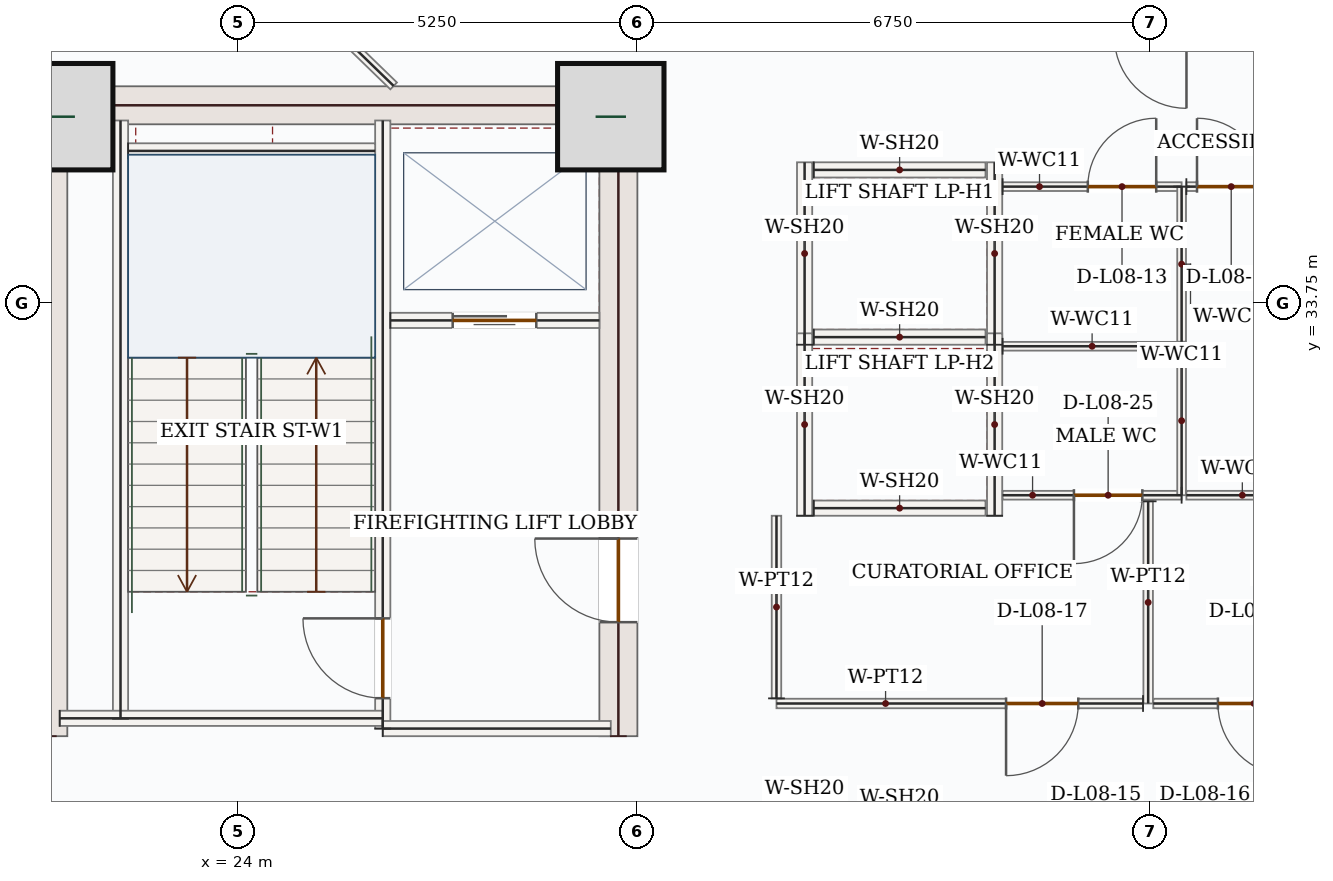
"""IFC4 building model, lengths in metres.
Left out: names, types, materials, properties, quantities, classifications, styles, units other than length and angle.
Written with IfcOpenShell. Run it as: python <this file> out.ifc"""

import sys

from ifc_helpers import new_model, si_unit, direction, frame, frame_2d, origin, origin_2d, place, context, subcontext, project, spatial, rectangle, extrude, source, transform, mapped, element, fill, save


model = new_model("IFC4")
c1 = context("Model", 3, precision=1e-05, world=origin(), true_north=direction((0.0, 1.0)))
c2 = subcontext(c1, "Body", "Model", "MODEL_VIEW")
j1 = project(units=[si_unit("LENGTHUNIT", "METRE"), si_unit("PLANEANGLEUNIT", "RADIAN")], contexts=[c1])
p1 = place(None, origin())
s1 = spatial("IfcSite", under=j1, at=p1, CompositionType="ELEMENT")
p2 = place(p1, origin())
s2 = spatial("IfcBuilding", under=s1, at=p2, CompositionType="ELEMENT")
p3 = place(p2, frame((0.0, 0.0, 41.7)))
s3 = spatial("IfcBuildingStorey", under=s2, at=p3, CompositionType="ELEMENT", Elevation=41.7)
m1 = source(origin(), c2, "Body", "SweptSolid", [
    extrude(rectangle(XDim=8.55, YDim=0.5, at=frame_2d((4.275, 0.0))), origin(), (0.0, 0.0, 1.0), 3.95),
])
p4 = place(p3, frame((21.5, 28.05, 0.0), z_axis=(0.0, 0.0, 1.0), x_axis=(0.0, 1.0, 0.0)))
e1 = element("IfcWall", 1, at=p4, inside=s3, PredefinedType="SHEAR", context=c2, shape_type="MappedRepresentation", body=[
    mapped(m1, transform((0.0, 0.0, 0.0), x_axis=(1.0, 0.0, 0.0), y_axis=(0.0, 1.0, 0.0), z_axis=(0.0, 0.0, 1.0), scale=1.0)),
])
p5 = place(p3, frame((29.0, 28.05, 0.0), z_axis=(0.0, 0.0, 1.0), x_axis=(0.0, 1.0, 0.0)))
e2 = element("IfcWall", 2, at=p5, inside=s3, PredefinedType="SHEAR", context=c2, shape_type="SweptSolid", body=[
    extrude(rectangle(XDim=8.55, YDim=0.5, at=frame_2d((4.275, 0.0))), origin(), (0.0, 0.0, 1.0), 3.95),
])
p6 = place(p5, frame((1.5, 0.0, 0.0)))
e3 = element("IfcOpeningElement", 3, at=p6, cuts=e2, PredefinedType="OPENING", context=c2, shape_type="SweptSolid", body=[
    extrude(rectangle(XDim=1.1, YDim=2.2, at=frame_2d((0.55, 1.1))), frame((0.0, 0.26, 0.0), z_axis=(0.0, -1.0, 0.0), x_axis=(1.0, 0.0, 0.0)), (0.0, 0.0, 1.0), 0.52),
])
m2 = source(origin(), c2, "Body", "SweptSolid", [
    extrude(rectangle(XDim=7.0, YDim=0.5, at=frame_2d((3.5, 0.0))), origin(), (0.0, 0.0, 1.0), 3.95),
])
p7 = place(p3, frame((21.75, 36.35, 0.0), z_axis=(0.0, 0.0, 1.0), x_axis=(1.0, 0.0, 0.0)))
e4 = element("IfcWall", 4, at=p7, inside=s3, PredefinedType="SHEAR", context=c2, shape_type="MappedRepresentation", body=[
    mapped(m2, transform((0.0, 0.0, 0.0), x_axis=(1.0, 0.0, 0.0), y_axis=(0.0, 1.0, 0.0), z_axis=(0.0, 0.0, 1.0), scale=1.0)),
])
m3 = source(origin(), c2, "Body", "SweptSolid", [
    extrude(rectangle(XDim=1.4, YDim=1.4, at=origin_2d()), origin(), (0.0, 0.0, 1.0), 4.2),
])
for number, where, z_axis, x_axis in (
    (5, (21.65, 36.2, 0.0), (0.0, 0.0, 1.0), (1.0, 0.0, 0.0)),
    (6, (28.9, 36.2, 0.0), (0.0, 0.0, 1.0), (1.0, 0.0, 0.0)),
):
    element("IfcColumn", number, at=place(p3, frame(where, z_axis=z_axis, x_axis=x_axis)), inside=s3, PredefinedType="COLUMN", context=c2, shape_type="MappedRepresentation", body=[
        mapped(m3, transform((0.0, 0.0, 0.0), x_axis=(1.0, 0.0, 0.0), y_axis=(0.0, 1.0, 0.0), z_axis=(0.0, 0.0, 1.0), scale=1.0)),
    ])
m4 = source(origin(), c2, "Body", "SweptSolid", [
    extrude(rectangle(XDim=5.258, YDim=0.32, at=frame_2d((2.629, 0.0))), origin(), (0.0, 0.0, 1.0), 3.95),
])
p8 = place(p3, frame((18.94, 35.542, 0.0), z_axis=(0.0, 0.0, 1.0), x_axis=(0.707106781187, 0.707106781187, 0.0)))
e7 = element("IfcWall", 7, at=p8, inside=s3, PredefinedType="SOLIDWALL", context=c2, shape_type="MappedRepresentation", body=[
    mapped(m4, transform((0.0, 0.0, 0.0), x_axis=(1.0, 0.0, 0.0), y_axis=(0.0, 1.0, 0.0), z_axis=(0.0, 0.0, 1.0), scale=1.0)),
])
m5 = source(origin(), c2, "Body", "SweptSolid", [
    extrude(rectangle(XDim=7.87, YDim=0.2, at=frame_2d((3.935, 0.0))), origin(), (0.0, 0.0, 1.0), 3.95),
])
p9 = place(p3, frame((22.45, 28.28, 0.0), z_axis=(0.0, 0.0, 1.0), x_axis=(0.0, 1.0, 0.0)))
e8 = element("IfcWall", 8, at=p9, inside=s3, PredefinedType="SOLIDWALL", context=c2, shape_type="MappedRepresentation", body=[
    mapped(m5, transform((0.0, 0.0, 0.0), x_axis=(1.0, 0.0, 0.0), y_axis=(0.0, 1.0, 0.0), z_axis=(0.0, 0.0, 1.0), scale=1.0)),
])
p10 = place(p3, frame((25.9, 28.15, 0.0), z_axis=(0.0, 0.0, 1.0), x_axis=(0.0, 1.0, 0.0)))
e9 = element("IfcWall", 9, at=p10, inside=s3, PredefinedType="SOLIDWALL", context=c2, shape_type="SweptSolid", body=[
    extrude(rectangle(XDim=8.0, YDim=0.2, at=frame_2d((4.0, 0.0))), origin(), (0.0, 0.0, 1.0), 3.95),
])
p11 = place(p10, frame((0.4, 0.0, 0.0)))
e10 = element("IfcOpeningElement", 10, at=p11, cuts=e9, PredefinedType="OPENING", context=c2, shape_type="SweptSolid", body=[
    extrude(rectangle(XDim=1.05, YDim=2.15, at=frame_2d((0.525, 1.075))), frame((0.0, 0.11, 0.0), z_axis=(0.0, -1.0, 0.0), x_axis=(1.0, 0.0, 0.0)), (0.0, 0.0, 1.0), 0.22),
])
m6 = source(origin(), c2, "Body", "SweptSolid", [
    extrude(rectangle(XDim=4.25, YDim=0.2, at=frame_2d((2.125, 0.0))), origin(), (0.0, 0.0, 1.0), 3.95),
])
p12 = place(p3, frame((21.65, 28.285, 0.0), z_axis=(0.0, 0.0, 1.0), x_axis=(1.0, 0.0, 0.0)))
e11 = element("IfcWall", 11, at=p12, inside=s3, PredefinedType="SOLIDWALL", context=c2, shape_type="MappedRepresentation", body=[
    mapped(m6, transform((0.0, 0.0, 0.0), x_axis=(1.0, 0.0, 0.0), y_axis=(0.0, 1.0, 0.0), z_axis=(0.0, 0.0, 1.0), scale=1.0)),
])
m7 = source(origin(), c2, "Body", "SweptSolid", [
    extrude(rectangle(XDim=3.0, YDim=0.2, at=frame_2d((1.5, 0.0))), origin(), (0.0, 0.0, 1.0), 3.95),
])
p13 = place(p3, frame((25.9, 28.15, 0.0), z_axis=(0.0, 0.0, 1.0), x_axis=(1.0, 0.0, 0.0)))
e12 = element("IfcWall", 12, at=p13, inside=s3, PredefinedType="SOLIDWALL", context=c2, shape_type="MappedRepresentation", body=[
    mapped(m7, transform((0.0, 0.0, 0.0), x_axis=(1.0, 0.0, 0.0), y_axis=(0.0, 1.0, 0.0), z_axis=(0.0, 0.0, 1.0), scale=1.0)),
])
m8 = source(origin(), c2, "Body", "SweptSolid", [
    extrude(rectangle(XDim=3.25, YDim=0.2, at=frame_2d((1.625, 0.0))), origin(), (0.0, 0.0, 1.0), 3.95),
])
p14 = place(p3, frame((22.55, 35.75, 0.0), z_axis=(0.0, 0.0, 1.0), x_axis=(1.0, 0.0, 0.0)))
e13 = element("IfcWall", 13, at=p14, inside=s3, PredefinedType="SOLIDWALL", context=c2, shape_type="MappedRepresentation", body=[
    mapped(m8, transform((0.0, 0.0, 0.0), x_axis=(1.0, 0.0, 0.0), y_axis=(0.0, 1.0, 0.0), z_axis=(0.0, 0.0, 1.0), scale=1.0)),
])
p15 = place(p3, frame((26.0, 33.52, 0.0), z_axis=(0.0, 0.0, 1.0), x_axis=(1.0, 0.0, 0.0)))
e14 = element("IfcWall", 14, at=p15, inside=s3, PredefinedType="SOLIDWALL", context=c2, shape_type="SweptSolid", body=[
    extrude(rectangle(XDim=2.75, YDim=0.2, at=frame_2d((1.375, 0.0))), origin(), (0.0, 0.0, 1.0), 3.95),
])
p16 = place(p15, frame((0.82, 0.0, 0.0)))
e15 = element("IfcOpeningElement", 15, at=p16, cuts=e14, PredefinedType="OPENING", context=c2, shape_type="SweptSolid", body=[
    extrude(rectangle(XDim=1.1, YDim=2.15, at=frame_2d((0.55, 1.075))), frame((0.0, 0.11, 0.0), z_axis=(0.0, -1.0, 0.0), x_axis=(1.0, 0.0, 0.0)), (0.0, 0.0, 1.0), 0.22),
])
m9 = source(origin(), c2, "Body", "SweptSolid", [
    extrude(rectangle(XDim=2.4, YDim=0.2, at=frame_2d((1.2, 0.0))), origin(), (0.0, 0.0, 1.0), 3.95),
])
for number, where, z_axis, x_axis in (
    (16, (31.45, 33.2, 0.0), (0.0, 0.0, 1.0), (0.0, 1.0, 0.0)),
    (17, (33.95, 33.2, 0.0), (0.0, 0.0, 1.0), (0.0, 1.0, 0.0)),
):
    element("IfcWall", number, at=place(p3, frame(where, z_axis=z_axis, x_axis=x_axis)), inside=s3, PredefinedType="SOLIDWALL", context=c2, shape_type="MappedRepresentation", body=[
        mapped(m9, transform((0.0, 0.0, 0.0), x_axis=(1.0, 0.0, 0.0), y_axis=(0.0, 1.0, 0.0), z_axis=(0.0, 0.0, 1.0), scale=1.0)),
    ])
m10 = source(origin(), c2, "Body", "SweptSolid", [
    extrude(rectangle(XDim=2.26, YDim=0.2, at=frame_2d((1.13, 0.0))), origin(), (0.0, 0.0, 1.0), 3.95),
])
for number, where, z_axis, x_axis in (
    (18, (31.57, 33.3, 0.0), (0.0, 0.0, 1.0), (1.0, 0.0, 0.0)),
    (19, (31.57, 35.5, 0.0), (0.0, 0.0, 1.0), (1.0, 0.0, 0.0)),
):
    element("IfcWall", number, at=place(p3, frame(where, z_axis=z_axis, x_axis=x_axis)), inside=s3, PredefinedType="SOLIDWALL", context=c2, shape_type="MappedRepresentation", body=[
        mapped(m10, transform((0.0, 0.0, 0.0), x_axis=(1.0, 0.0, 0.0), y_axis=(0.0, 1.0, 0.0), z_axis=(0.0, 0.0, 1.0), scale=1.0)),
    ])
for number, where, z_axis, x_axis in (
    (20, (31.45, 30.95, 0.0), (0.0, 0.0, 1.0), (0.0, 1.0, 0.0)),
    (21, (33.95, 30.95, 0.0), (0.0, 0.0, 1.0), (0.0, 1.0, 0.0)),
):
    element("IfcWall", number, at=place(p3, frame(where, z_axis=z_axis, x_axis=x_axis)), inside=s3, PredefinedType="SOLIDWALL", context=c2, shape_type="MappedRepresentation", body=[
        mapped(m9, transform((0.0, 0.0, 0.0), x_axis=(1.0, 0.0, 0.0), y_axis=(0.0, 1.0, 0.0), z_axis=(0.0, 0.0, 1.0), scale=1.0)),
    ])
p17 = place(p3, frame((31.57, 31.05, 0.0), z_axis=(0.0, 0.0, 1.0), x_axis=(1.0, 0.0, 0.0)))
e22 = element("IfcWall", 22, at=p17, inside=s3, PredefinedType="SOLIDWALL", context=c2, shape_type="MappedRepresentation", body=[
    mapped(m10, transform((0.0, 0.0, 0.0), x_axis=(1.0, 0.0, 0.0), y_axis=(0.0, 1.0, 0.0), z_axis=(0.0, 0.0, 1.0), scale=1.0)),
])
p18 = place(p3, frame((36.41, 31.22, 0.0), z_axis=(0.0, 0.0, 1.0), x_axis=(-1.0, 0.0, 0.0)))
e23 = element("IfcWall", 23, at=p18, inside=s3, PredefinedType="PARTITIONING", context=c2, shape_type="SweptSolid", body=[
    extrude(rectangle(XDim=2.355, YDim=0.115, at=frame_2d((1.177, 0.0))), origin(), (0.0, 0.0, 1.0), 3.95),
])
p19 = place(p18, frame((0.517, 0.0, 0.0)))
e24 = element("IfcOpeningElement", 24, at=p19, cuts=e23, PredefinedType="OPENING", context=c2, shape_type="SweptSolid", body=[
    extrude(rectangle(XDim=0.9, YDim=2.1, at=frame_2d((0.45, 1.05))), frame((0.0, 0.067, 0.0), z_axis=(0.0, -1.0, 0.0), x_axis=(1.0, 0.0, 0.0)), (0.0, 0.0, 1.0), 0.135),
])
m11 = source(origin(), c2, "Body", "SweptSolid", [
    extrude(rectangle(XDim=2.355, YDim=0.115, at=frame_2d((1.177, 0.0))), origin(), (0.0, 0.0, 1.0), 3.95),
])
p20 = place(p3, frame((34.055, 33.18, 0.0), z_axis=(0.0, 0.0, 1.0), x_axis=(1.0, 0.0, 0.0)))
e25 = element("IfcWall", 25, at=p20, inside=s3, PredefinedType="PARTITIONING", context=c2, shape_type="MappedRepresentation", body=[
    mapped(m11, transform((0.0, 0.0, 0.0), x_axis=(1.0, 0.0, 0.0), y_axis=(0.0, 1.0, 0.0), z_axis=(0.0, 0.0, 1.0), scale=1.0)),
])
m12 = source(origin(), c2, "Body", "SweptSolid", [
    extrude(rectangle(XDim=1.96, YDim=0.115, at=frame_2d((0.98, 0.0))), origin(), (0.0, 0.0, 1.0), 3.95),
])
p21 = place(p3, frame((36.41, 33.18, 0.0), z_axis=(0.0, 0.0, 1.0), x_axis=(0.0, -1.0, 0.0)))
e26 = element("IfcWall", 26, at=p21, inside=s3, PredefinedType="PARTITIONING", context=c2, shape_type="MappedRepresentation", body=[
    mapped(m12, transform((0.0, 0.0, 0.0), x_axis=(1.0, 0.0, 0.0), y_axis=(0.0, 1.0, 0.0), z_axis=(0.0, 0.0, 1.0), scale=1.0)),
])
p22 = place(p3, frame((34.055, 35.28, 0.0), z_axis=(0.0, 0.0, 1.0), x_axis=(1.0, 0.0, 0.0)))
e27 = element("IfcWall", 27, at=p22, inside=s3, PredefinedType="PARTITIONING", context=c2, shape_type="SweptSolid", body=[
    extrude(rectangle(XDim=2.355, YDim=0.115, at=frame_2d((1.177, 0.0))), origin(), (0.0, 0.0, 1.0), 3.95),
])
p23 = place(p22, frame((1.121, 0.0, 0.0)))
e28 = element("IfcOpeningElement", 28, at=p23, cuts=e27, PredefinedType="OPENING", context=c2, shape_type="SweptSolid", body=[
    extrude(rectangle(XDim=0.9, YDim=2.1, at=frame_2d((0.45, 1.05))), frame((0.0, 0.067, 0.0), z_axis=(0.0, -1.0, 0.0), x_axis=(1.0, 0.0, 0.0)), (0.0, 0.0, 1.0), 0.135),
])
m13 = source(origin(), c2, "Body", "SweptSolid", [
    extrude(rectangle(XDim=2.04, YDim=0.115, at=frame_2d((1.02, 0.0))), origin(), (0.0, 0.0, 1.0), 3.95),
])
p24 = place(p3, frame((36.41, 35.28, 0.0), z_axis=(0.0, 0.0, 1.0), x_axis=(0.0, -1.0, 0.0)))
e29 = element("IfcWall", 29, at=p24, inside=s3, PredefinedType="PARTITIONING", context=c2, shape_type="MappedRepresentation", body=[
    mapped(m13, transform((0.0, 0.0, 0.0), x_axis=(1.0, 0.0, 0.0), y_axis=(0.0, 1.0, 0.0), z_axis=(0.0, 0.0, 1.0), scale=1.0)),
])
m14 = source(origin(), c2, "Body", "SweptSolid", [
    extrude(rectangle(XDim=1.473, YDim=0.115, at=frame_2d((0.736, 0.0))), origin(), (0.0, 0.0, 1.0), 3.95),
])
p25 = place(p3, frame((37.945, 31.22, 0.0), z_axis=(0.0, 0.0, 1.0), x_axis=(-1.0, 0.0, 0.0)))
e30 = element("IfcWall", 30, at=p25, inside=s3, PredefinedType="PARTITIONING", context=c2, shape_type="MappedRepresentation", body=[
    mapped(m14, transform((0.0, 0.0, 0.0), x_axis=(1.0, 0.0, 0.0), y_axis=(0.0, 1.0, 0.0), z_axis=(0.0, 0.0, 1.0), scale=1.0)),
])
p26 = place(p3, frame((36.472, 35.28, 0.0), z_axis=(0.0, 0.0, 1.0), x_axis=(1.0, 0.0, 0.0)))
e31 = element("IfcWall", 31, at=p26, inside=s3, PredefinedType="PARTITIONING", context=c2, shape_type="SweptSolid", body=[
    extrude(rectangle(XDim=1.473, YDim=0.115, at=frame_2d((0.736, 0.0))), origin(), (0.0, 0.0, 1.0), 3.95),
])
p27 = place(p26, frame((0.14, 0.0, 0.0)))
e32 = element("IfcOpeningElement", 32, at=p27, cuts=e31, PredefinedType="OPENING", context=c2, shape_type="SweptSolid", body=[
    extrude(rectangle(XDim=0.9, YDim=2.1, at=frame_2d((0.45, 1.05))), frame((0.0, 0.067, 0.0), z_axis=(0.0, -1.0, 0.0), x_axis=(1.0, 0.0, 0.0)), (0.0, 0.0, 1.0), 0.135),
])
m15 = source(origin(), c2, "Body", "SweptSolid", [
    extrude(rectangle(XDim=2.66, YDim=0.125, at=frame_2d((1.33, 0.0))), origin(), (0.0, 0.0, 1.0), 3.95),
])
p28 = place(p3, frame((35.97, 31.14, 0.0), z_axis=(0.0, 0.0, 1.0), x_axis=(0.0, -1.0, 0.0)))
e33 = element("IfcWall", 33, at=p28, inside=s3, PredefinedType="PARTITIONING", context=c2, shape_type="MappedRepresentation", body=[
    mapped(m15, transform((0.0, 0.0, 0.0), x_axis=(1.0, 0.0, 0.0), y_axis=(0.0, 1.0, 0.0), z_axis=(0.0, 0.0, 1.0), scale=1.0)),
])
p29 = place(p3, frame((35.903, 28.48, 0.0), z_axis=(0.0, 0.0, 1.0), x_axis=(-1.0, 0.0, 0.0)))
e34 = element("IfcWall", 34, at=p29, inside=s3, PredefinedType="PARTITIONING", context=c2, shape_type="SweptSolid", body=[
    extrude(rectangle(XDim=4.823, YDim=0.125, at=frame_2d((2.411, 0.0))), origin(), (0.0, 0.0, 1.0), 3.95),
])
p30 = place(p29, frame((0.852, 0.0, 0.0)))
e35 = element("IfcOpeningElement", 35, at=p30, cuts=e34, PredefinedType="OPENING", context=c2, shape_type="SweptSolid", body=[
    extrude(rectangle(XDim=0.95, YDim=2.15, at=frame_2d((0.475, 1.075))), frame((0.0, 0.073, 0.0), z_axis=(0.0, -1.0, 0.0), x_axis=(1.0, 0.0, 0.0)), (0.0, 0.0, 1.0), 0.145),
])
m16 = source(origin(), c2, "Body", "SweptSolid", [
    extrude(rectangle(XDim=2.402, YDim=0.125, at=frame_2d((1.201, 0.0))), origin(), (0.0, 0.0, 1.0), 3.95),
])
p31 = place(p3, frame((31.08, 28.548, 0.0), z_axis=(0.0, 0.0, 1.0), x_axis=(0.0, 1.0, 0.0)))
e36 = element("IfcWall", 36, at=p31, inside=s3, PredefinedType="PARTITIONING", context=c2, shape_type="MappedRepresentation", body=[
    mapped(m16, transform((0.0, 0.0, 0.0), x_axis=(1.0, 0.0, 0.0), y_axis=(0.0, 1.0, 0.0), z_axis=(0.0, 0.0, 1.0), scale=1.0)),
])
p32 = place(p3, frame((40.853, 28.48, 0.0), z_axis=(0.0, 0.0, 1.0), x_axis=(-1.0, 0.0, 0.0)))
e37 = element("IfcWall", 37, at=p32, inside=s3, PredefinedType="PARTITIONING", context=c2, shape_type="SweptSolid", body=[
    extrude(rectangle(XDim=4.815, YDim=0.125, at=frame_2d((2.407, 0.0))), origin(), (0.0, 0.0, 1.0), 3.95),
])
p33 = place(p32, frame((3.015, 0.0, 0.0)))
e38 = element("IfcOpeningElement", 38, at=p33, cuts=e37, PredefinedType="OPENING", context=c2, shape_type="SweptSolid", body=[
    extrude(rectangle(XDim=0.95, YDim=2.15, at=frame_2d((0.475, 1.075))), frame((0.0, 0.073, 0.0), z_axis=(0.0, -1.0, 0.0), x_axis=(1.0, 0.0, 0.0)), (0.0, 0.0, 1.0), 0.145),
])
m17 = source(origin(), c2, "Body", "SweptSolid", [
    extrude(rectangle(XDim=1.771, YDim=0.125, at=frame_2d((0.885, 0.0))), origin(), (0.0, 0.0, 1.0), 3.95),
])
p34 = place(p3, frame((24.772, 37.838, 0.0), z_axis=(0.0, 0.0, 1.0), x_axis=(0.717777212316, -0.696272844135, 0.0)))
e39 = element("IfcWall", 39, at=p34, inside=s3, PredefinedType="PARTITIONING", context=c2, shape_type="MappedRepresentation", body=[
    mapped(m17, transform((0.0, 0.0, 0.0), x_axis=(1.0, 0.0, 0.0), y_axis=(0.0, 1.0, 0.0), z_axis=(0.0, 0.0, 1.0), scale=1.0)),
])
m18 = source(origin(), c2, "Body", "SweptSolid", [
    extrude(rectangle(XDim=1.05, YDim=2.15, at=frame_2d((0.525, 1.075))), frame((0.0, 0.025, 0.0), z_axis=(0.0, -1.0, 0.0), x_axis=(1.0, 0.0, 0.0)), (0.0, 0.0, 1.0), 0.05),
])
p35 = place(p11, origin())
e40 = element("IfcDoor", 40, at=p35, inside=s3, OperationType="SINGLE_SWING_RIGHT", PredefinedType="DOOR", context=c2, shape_type="MappedRepresentation", body=[
    mapped(m18, transform((0.0, 0.0, 0.0), x_axis=(1.0, 0.0, 0.0), y_axis=(0.0, 1.0, 0.0), z_axis=(0.0, 0.0, 1.0), scale=1.0)),
])
fill(e10, e40)
m19 = source(origin(), c2, "Body", "SweptSolid", [
    extrude(rectangle(XDim=1.1, YDim=2.15, at=frame_2d((0.55, 1.075))), frame((0.0, 0.025, 0.0), z_axis=(0.0, -1.0, 0.0), x_axis=(1.0, 0.0, 0.0)), (0.0, 0.0, 1.0), 0.05),
])
p36 = place(p16, origin())
e41 = element("IfcDoor", 41, at=p36, inside=s3, OperationType="DOUBLE_DOOR_SLIDING", PredefinedType="DOOR", context=c2, shape_type="MappedRepresentation", body=[
    mapped(m19, transform((0.0, 0.0, 0.0), x_axis=(1.0, 0.0, 0.0), y_axis=(0.0, 1.0, 0.0), z_axis=(0.0, 0.0, 1.0), scale=1.0)),
])
fill(e15, e41)
m20 = source(origin(), c2, "Body", "SweptSolid", [
    extrude(rectangle(XDim=1.1, YDim=2.2, at=frame_2d((0.55, 1.1))), frame((0.0, 0.025, 0.0), z_axis=(0.0, -1.0, 0.0), x_axis=(1.0, 0.0, 0.0)), (0.0, 0.0, 1.0), 0.05),
])
p37 = place(p6, origin())
e42 = element("IfcDoor", 42, at=p37, inside=s3, OperationType="SINGLE_SWING_RIGHT", PredefinedType="DOOR", context=c2, shape_type="MappedRepresentation", body=[
    mapped(m20, transform((0.0, 0.0, 0.0), x_axis=(1.0, 0.0, 0.0), y_axis=(0.0, 1.0, 0.0), z_axis=(0.0, 0.0, 1.0), scale=1.0)),
])
fill(e3, e42)
m21 = source(origin(), c2, "Body", "SweptSolid", [
    extrude(rectangle(XDim=0.9, YDim=2.1, at=frame_2d((0.45, 1.05))), frame((0.0, 0.025, 0.0), z_axis=(0.0, -1.0, 0.0), x_axis=(1.0, 0.0, 0.0)), (0.0, 0.0, 1.0), 0.05),
])
p38 = place(p23, origin())
e43 = element("IfcDoor", 43, at=p38, inside=s3, OperationType="SINGLE_SWING_RIGHT", PredefinedType="DOOR", context=c2, shape_type="MappedRepresentation", body=[
    mapped(m21, transform((0.0, 0.0, 0.0), x_axis=(1.0, 0.0, 0.0), y_axis=(0.0, 1.0, 0.0), z_axis=(0.0, 0.0, 1.0), scale=1.0)),
])
fill(e28, e43)
p39 = place(p27, origin())
e44 = element("IfcDoor", 44, at=p39, inside=s3, OperationType="SINGLE_SWING_LEFT", PredefinedType="DOOR", context=c2, shape_type="MappedRepresentation", body=[
    mapped(m21, transform((0.0, 0.0, 0.0), x_axis=(1.0, 0.0, 0.0), y_axis=(0.0, 1.0, 0.0), z_axis=(0.0, 0.0, 1.0), scale=1.0)),
])
fill(e32, e44)
m22 = source(origin(), c2, "Body", "SweptSolid", [
    extrude(rectangle(XDim=0.95, YDim=2.15, at=frame_2d((0.475, 1.075))), frame((0.0, 0.025, 0.0), z_axis=(0.0, -1.0, 0.0), x_axis=(1.0, 0.0, 0.0)), (0.0, 0.0, 1.0), 0.05),
])
p40 = place(p30, origin())
e45 = element("IfcDoor", 45, at=p40, inside=s3, OperationType="SINGLE_SWING_RIGHT", PredefinedType="DOOR", context=c2, shape_type="MappedRepresentation", body=[
    mapped(m22, transform((0.0, 0.0, 0.0), x_axis=(1.0, 0.0, 0.0), y_axis=(0.0, 1.0, 0.0), z_axis=(0.0, 0.0, 1.0), scale=1.0)),
])
fill(e35, e45)
p41 = place(p33, origin())
e46 = element("IfcDoor", 46, at=p41, inside=s3, OperationType="SINGLE_SWING_LEFT", PredefinedType="DOOR", context=c2, shape_type="MappedRepresentation", body=[
    mapped(m22, transform((0.0, 0.0, 0.0), x_axis=(1.0, 0.0, 0.0), y_axis=(0.0, 1.0, 0.0), z_axis=(0.0, 0.0, 1.0), scale=1.0)),
])
fill(e38, e46)
p42 = place(p19, origin())
e47 = element("IfcDoor", 47, at=p42, inside=s3, OperationType="SINGLE_SWING_RIGHT", PredefinedType="DOOR", context=c2, shape_type="MappedRepresentation", body=[
    mapped(m21, transform((0.0, 0.0, 0.0), x_axis=(1.0, 0.0, 0.0), y_axis=(0.0, 1.0, 0.0), z_axis=(0.0, 0.0, 1.0), scale=1.0)),
])
fill(e24, e47)
save(model, sys.argv[1])
